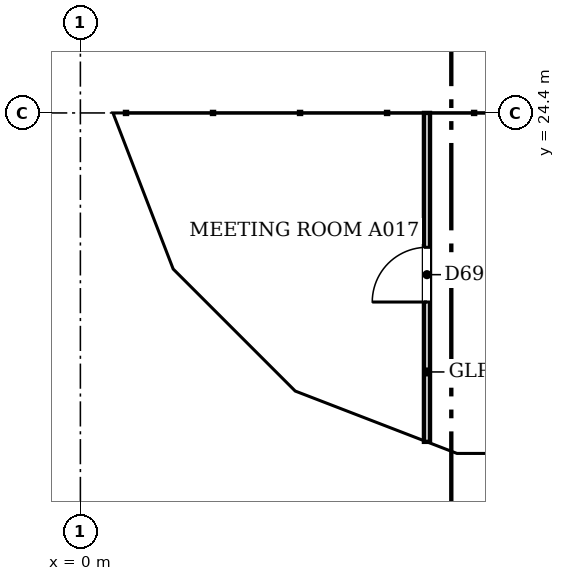
"""IFC4 building model, lengths in metres.
Left out: names, types, materials, properties, quantities, classifications, styles, units other than length and angle.
Written with IfcOpenShell. Run it as: python <this file> out.ifc"""

import sys

from ifc_helpers import new_model, si_unit, direction, frame, frame_2d, origin, place, context, subcontext, project, spatial, polyline, rectangle, outline, extrude, faceted_brep, source, transform, mapped, element, fill, save


model = new_model("IFC4")
c1 = context("Model", 3, precision=1e-05, world=origin(), true_north=direction((0.0, 1.0)))
c2 = subcontext(c1, "Body", "Model", "MODEL_VIEW")
j1 = project(units=[si_unit("LENGTHUNIT", "METRE"), si_unit("PLANEANGLEUNIT", "RADIAN")], contexts=[c1])
p1 = place(None, origin())
s1 = spatial("IfcSite", under=j1, at=p1, CompositionType="ELEMENT")
p2 = place(p1, origin())
s2 = spatial("IfcBuilding", under=s1, at=p2, CompositionType="ELEMENT")
p3 = place(p2, frame((0.0, 0.0, 146.8)))
s3 = spatial("IfcBuildingStorey", under=s2, at=p3, CompositionType="ELEMENT", Elevation=146.8)
m1 = source(origin(), c2, "Body", "Brep", [
    faceted_brep([(3.003, -0.25, 0.0), (3.05, -0.25, 0.06), (3.05, -0.25, 7.54), (3.003, -0.25, 7.6), (0.0, -0.25, 3.8), (0.0, 0.25, 3.8), (2.957, 0.25, 7.541), (2.957, 0.25, 0.059), (3.003, 0.0, 0.0), (3.003, 0.0, 7.6)], [[[0, 1, 2, 3, 4]], [[5, 6, 7]], [[1, 0, 8]], [[9, 3, 2]], [[6, 5, 4, 3, 9]], [[5, 7, 8, 0, 4]], [[1, 8, 7, 6, 9, 2]]]),
])
p4 = place(p3, frame((0.25, 27.45, -3.8), z_axis=(0.0, 0.0, 1.0), x_axis=(0.0, -1.0, 0.0)))
e1 = element("IfcWall", 1, at=p4, inside=s3, PredefinedType="SOLIDWALL", context=c2, shape_type="MappedRepresentation", body=[
    mapped(m1, transform((0.0, 0.0, 0.0), scale=1.0)),
])
m2 = source(origin(), c2, "Body", "SweptSolid", [
    extrude(outline(polyline([(2.803, 6.944), (0.319, 3.8), (2.803, 0.656), (2.803, 6.944)])), frame((0.0, 0.26, 0.0), z_axis=(0.0, -1.0, 0.0), x_axis=(1.0, 0.0, 0.0)), (0.0, 0.0, 1.0), 0.52),
])
p5 = place(p4, origin())
e2 = element("IfcOpeningElement", 2, at=p5, cuts=e1, PredefinedType="OPENING", context=c2, shape_type="MappedRepresentation", body=[
    mapped(m2, transform((0.0, 0.0, 0.0), scale=1.0)),
])
m3 = source(origin(), c2, "Body", "Brep", [
    faceted_brep([(0.047, -0.25, 0.0), (2.997, -0.25, 3.8), (0.047, -0.25, 7.6), (0.0, -0.25, 7.541), (0.0, -0.25, 0.059), (0.093, 0.25, 7.54), (2.944, 0.25, 3.868), (2.944, 0.25, 3.732), (0.093, 0.25, 0.06), (2.997, 0.0, 3.8), (0.047, 0.0, 0.0), (0.047, 0.0, 7.6)], [[[0, 1, 2, 3, 4]], [[5, 6, 7, 8]], [[8, 7, 9, 1, 0, 10]], [[6, 5, 11, 2, 1, 9]], [[3, 2, 11]], [[10, 0, 4]], [[8, 10, 4, 3, 11, 5]], [[9, 7, 6]]]),
])
p6 = place(p3, frame((0.233, 24.49, -3.8), z_axis=(0.0, 0.0, 1.0), x_axis=(0.359901446078, -0.932990326376, 0.0)))
e3 = element("IfcWall", 3, at=p6, inside=s3, PredefinedType="SOLIDWALL", context=c2, shape_type="MappedRepresentation", body=[
    mapped(m3, transform((0.0, 0.0, 0.0), scale=1.0)),
])
m4 = source(origin(), c2, "Body", "SweptSolid", [
    extrude(outline(polyline([(0.247, 0.665), (2.681, 3.8), (0.247, 6.935), (0.247, 0.665)])), frame((0.0, 0.26, 0.0), z_axis=(0.0, -1.0, 0.0), x_axis=(1.0, 0.0, 0.0)), (0.0, 0.0, 1.0), 0.52),
])
p7 = place(p6, origin())
e4 = element("IfcOpeningElement", 4, at=p7, cuts=e3, PredefinedType="OPENING", context=c2, shape_type="MappedRepresentation", body=[
    mapped(m4, transform((0.0, 0.0, 0.0), scale=1.0)),
])
m5 = source(origin(), c2, "Body", "Brep", [
    faceted_brep([(2.944, -0.25, 0.0), (2.997, -0.25, 0.068), (2.997, -0.25, 7.532), (2.944, -0.25, 7.6), (0.0, -0.25, 3.8), (0.053, 0.25, 3.868), (2.891, 0.25, 7.532), (2.891, 0.25, 0.068), (0.053, 0.25, 3.732), (2.944, 0.0, 0.0), (2.944, 0.0, 7.6), (0.0, 0.0, 3.8)], [[[0, 1, 2, 3, 4]], [[5, 6, 7, 8]], [[1, 0, 9]], [[10, 3, 2]], [[6, 5, 11, 4, 3, 10]], [[8, 7, 9, 0, 4, 11]], [[8, 11, 5]], [[1, 9, 7, 6, 10, 2]]]),
])
p8 = place(p3, frame((1.312, 21.694, -3.8), z_axis=(0.0, 0.0, 1.0), x_axis=(0.707066050402, -0.707147509625, 0.0)))
e5 = element("IfcWall", 5, at=p8, inside=s3, PredefinedType="SOLIDWALL", context=c2, shape_type="MappedRepresentation", body=[
    mapped(m5, transform((0.0, 0.0, 0.0), scale=1.0)),
])
m6 = source(origin(), c2, "Body", "SweptSolid", [
    extrude(outline(polyline([(2.744, 6.934), (0.316, 3.8), (2.744, 0.666), (2.744, 6.934)])), frame((0.0, 0.26, 0.0), z_axis=(0.0, -1.0, 0.0), x_axis=(1.0, 0.0, 0.0)), (0.0, 0.0, 1.0), 0.52),
])
p9 = place(p8, origin())
e6 = element("IfcOpeningElement", 6, at=p9, cuts=e5, PredefinedType="OPENING", context=c2, shape_type="MappedRepresentation", body=[
    mapped(m6, transform((0.0, 0.0, 0.0), scale=1.0)),
])
m7 = source(origin(), c2, "Body", "Brep", [
    faceted_brep([(0.053, -0.25, 0.0), (3.003, -0.25, 3.8), (0.053, -0.25, 7.6), (0.0, -0.25, 7.532), (0.0, -0.25, 0.068), (0.106, 0.25, 7.532), (2.957, 0.25, 3.86), (2.957, 0.25, 3.74), (0.106, 0.25, 0.068), (3.003, 0.0, 3.8), (0.053, 0.0, 0.0), (0.053, 0.0, 7.6)], [[[0, 1, 2, 3, 4]], [[5, 6, 7, 8]], [[8, 7, 9, 1, 0, 10]], [[6, 5, 11, 2, 1, 9]], [[3, 2, 11]], [[10, 0, 4]], [[8, 10, 4, 3, 11, 5]], [[9, 7, 6]]]),
])
p10 = place(p3, frame((3.344, 19.631, -3.8), z_axis=(0.0, 0.0, 1.0), x_axis=(0.933007896601, -0.359855894603, 0.0)))
e7 = element("IfcWall", 7, at=p10, inside=s3, PredefinedType="SOLIDWALL", context=c2, shape_type="MappedRepresentation", body=[
    mapped(m7, transform((0.0, 0.0, 0.0), scale=1.0)),
])
m8 = source(origin(), c2, "Body", "SweptSolid", [
    extrude(outline(polyline([(0.253, 0.665), (2.687, 3.8), (0.253, 6.935), (0.253, 0.665)])), frame((0.0, 0.26, 0.0), z_axis=(0.0, -1.0, 0.0), x_axis=(1.0, 0.0, 0.0)), (0.0, 0.0, 1.0), 0.52),
])
p11 = place(p10, origin())
e8 = element("IfcOpeningElement", 8, at=p11, cuts=e7, PredefinedType="OPENING", context=c2, shape_type="MappedRepresentation", body=[
    mapped(m8, transform((0.0, 0.0, 0.0), scale=1.0)),
])
m9 = source(origin(), c2, "Body", "Brep", [
    faceted_brep([(3.003, -0.25, 0.0), (6.053, -0.25, 3.8), (3.003, -0.25, 7.6), (0.0, -0.25, 3.8), (0.047, 0.25, 3.859), (3.003, 0.25, 7.6), (6.053, 0.25, 3.8), (3.003, 0.25, 0.0), (0.047, 0.25, 3.741), (0.0, 0.0, 3.8)], [[[0, 1, 2, 3]], [[4, 5, 6, 7, 8]], [[7, 6, 1, 0]], [[6, 5, 2, 1]], [[5, 4, 9, 3, 2]], [[8, 7, 0, 3, 9]], [[8, 9, 4]]]),
])
p12 = place(p3, frame((6.146, 18.55, -3.8), z_axis=(0.0, 0.0, 1.0), x_axis=(1.0, 0.0, 0.0)))
e9 = element("IfcWall", 9, at=p12, inside=s3, PredefinedType="SOLIDWALL", context=c2, shape_type="MappedRepresentation", body=[
    mapped(m9, transform((0.0, 0.0, 0.0), scale=1.0)),
])
m10 = source(origin(), c2, "Body", "SweptSolid", [
    extrude(outline(polyline([(3.005, 0.401), (5.733, 3.8), (3.005, 7.199), (0.319, 3.8), (3.005, 0.401)])), frame((0.0, 0.26, 0.0), z_axis=(0.0, -1.0, 0.0), x_axis=(1.0, 0.0, 0.0)), (0.0, 0.0, 1.0), 0.52),
])
p13 = place(p12, origin())
e10 = element("IfcOpeningElement", 10, at=p13, cuts=e9, PredefinedType="OPENING", context=c2, shape_type="MappedRepresentation", body=[
    mapped(m10, transform((0.0, 0.0, 0.0), scale=1.0)),
])
m11 = source(origin(), c2, "Body", "Brep", [
    faceted_brep([(3.05, -0.25, 0.0), (6.053, -0.25, 3.8), (0.0, -0.25, 3.8), (0.0, 0.25, 3.8), (6.007, 0.25, 3.8), (6.007, 0.25, 3.741), (3.05, 0.25, 0.0), (6.053, 0.0, 3.8)], [[[0, 1, 2]], [[3, 4, 5, 6]], [[6, 5, 7, 1, 0]], [[4, 3, 2, 1, 7]], [[3, 6, 0, 2]], [[5, 4, 7]]]),
])
p14 = place(p3, frame((0.25, 30.5, 0.0), z_axis=(0.0, 0.0, 1.0), x_axis=(0.0, -1.0, 0.0)))
e11 = element("IfcWall", 11, at=p14, inside=s3, PredefinedType="SOLIDWALL", context=c2, shape_type="MappedRepresentation", body=[
    mapped(m11, transform((0.0, 0.0, 0.0), scale=1.0)),
])
m12 = source(origin(), c2, "Body", "SweptSolid", [
    extrude(outline(polyline([(3.049, 0.401), (5.537, 3.55), (0.521, 3.55), (3.049, 0.401)])), frame((0.0, 0.26, 0.0), z_axis=(0.0, -1.0, 0.0), x_axis=(1.0, 0.0, 0.0)), (0.0, 0.0, 1.0), 0.52),
])
p15 = place(p14, origin())
e12 = element("IfcOpeningElement", 12, at=p15, cuts=e11, PredefinedType="OPENING", context=c2, shape_type="MappedRepresentation", body=[
    mapped(m12, transform((0.0, 0.0, 0.0), scale=1.0)),
])
m13 = source(origin(), c2, "Body", "Brep", [
    faceted_brep([(2.95, -0.25, 0.0), (3.003, -0.25, 0.068), (3.003, -0.25, 3.8), (0.0, -0.25, 3.8), (0.047, 0.25, 3.8), (2.898, 0.25, 3.8), (2.898, 0.25, 0.068), (0.047, 0.25, 3.74), (2.95, 0.0, 0.0), (0.0, 0.0, 3.8)], [[[0, 1, 2, 3]], [[4, 5, 6, 7]], [[1, 0, 8]], [[5, 4, 9, 3, 2]], [[7, 6, 8, 0, 3, 9]], [[7, 9, 4]], [[1, 8, 6, 5, 2]]]),
])
p16 = place(p3, frame((0.25, 24.447, 0.0), z_axis=(0.0, 0.0, 1.0), x_axis=(0.35992665181, -0.932980602862, 0.0)))
e13 = element("IfcWall", 13, at=p16, inside=s3, PredefinedType="SOLIDWALL", context=c2, shape_type="MappedRepresentation", body=[
    mapped(m13, transform((0.0, 0.0, 0.0), scale=1.0)),
])
m14 = source(origin(), c2, "Body", "SweptSolid", [
    extrude(outline(polyline([(2.75, 3.55), (0.511, 3.55), (2.75, 0.665), (2.75, 3.55)])), frame((0.0, 0.26, 0.0), z_axis=(0.0, -1.0, 0.0), x_axis=(1.0, 0.0, 0.0)), (0.0, 0.0, 1.0), 0.52),
])
p17 = place(p16, origin())
e14 = element("IfcOpeningElement", 14, at=p17, cuts=e13, PredefinedType="OPENING", context=c2, shape_type="MappedRepresentation", body=[
    mapped(m14, transform((0.0, 0.0, 0.0), scale=1.0)),
])
m15 = source(origin(), c2, "Body", "Brep", [
    faceted_brep([(0.053, -0.25, 0.0), (2.997, -0.25, 3.8), (0.0, -0.25, 3.8), (0.0, -0.25, 0.068), (0.106, 0.25, 3.8), (2.944, 0.25, 3.8), (2.944, 0.25, 3.732), (0.106, 0.25, 0.068), (2.997, 0.0, 3.8), (0.053, 0.0, 0.0)], [[[0, 1, 2, 3]], [[4, 5, 6, 7]], [[7, 6, 8, 1, 0, 9]], [[5, 4, 2, 1, 8]], [[9, 0, 3]], [[7, 9, 3, 2, 4]], [[6, 5, 8]]]),
])
p18 = place(p3, frame((1.274, 21.731, 0.0), z_axis=(0.0, 0.0, 1.0), x_axis=(0.707147509625, -0.707066050402, 0.0)))
e15 = element("IfcWall", 15, at=p18, inside=s3, PredefinedType="SOLIDWALL", context=c2, shape_type="MappedRepresentation", body=[
    mapped(m15, transform((0.0, 0.0, 0.0), scale=1.0)),
])
m16 = source(origin(), c2, "Body", "SweptSolid", [
    extrude(outline(polyline([(0.253, 0.666), (2.487, 3.55), (0.253, 3.55), (0.253, 0.666)])), frame((0.0, 0.26, 0.0), z_axis=(0.0, -1.0, 0.0), x_axis=(1.0, 0.0, 0.0)), (0.0, 0.0, 1.0), 0.52),
])
p19 = place(p18, origin())
e16 = element("IfcOpeningElement", 16, at=p19, cuts=e15, PredefinedType="OPENING", context=c2, shape_type="MappedRepresentation", body=[
    mapped(m16, transform((0.0, 0.0, 0.0), scale=1.0)),
])
m17 = source(origin(), c2, "Body", "Brep", [
    faceted_brep([(2.95, -0.25, 0.0), (2.997, -0.25, 0.059), (2.997, -0.25, 3.8), (0.0, -0.25, 3.8), (0.053, 0.25, 3.8), (2.904, 0.25, 3.8), (2.904, 0.25, 0.06), (0.053, 0.25, 3.732), (2.95, 0.0, 0.0), (0.0, 0.0, 3.8)], [[[0, 1, 2, 3]], [[4, 5, 6, 7]], [[1, 0, 8]], [[5, 4, 9, 3, 2]], [[7, 6, 8, 0, 3, 9]], [[7, 9, 4]], [[1, 8, 6, 5, 2]]]),
])
p20 = place(p3, frame((3.394, 19.612, 0.0), z_axis=(0.0, 0.0, 1.0), x_axis=(0.932990326376, -0.359901446078, 0.0)))
e17 = element("IfcWall", 17, at=p20, inside=s3, PredefinedType="SOLIDWALL", context=c2, shape_type="MappedRepresentation", body=[
    mapped(m17, transform((0.0, 0.0, 0.0), scale=1.0)),
])
p21 = place(p20, origin())
e18 = element("IfcOpeningElement", 18, at=p21, cuts=e17, PredefinedType="OPENING", context=c2, shape_type="MappedRepresentation", body=[
    mapped(m14, transform((0.0, 0.0, 0.0), scale=1.0)),
])
m18 = source(origin(), c2, "Body", "Brep", [
    faceted_brep([(0.047, -0.25, 0.0), (3.05, -0.25, 3.8), (0.0, -0.25, 3.8), (0.0, -0.25, 0.06), (0.093, 0.25, 3.8), (3.05, 0.25, 3.8), (0.093, 0.25, 0.059), (0.047, 0.0, 0.0)], [[[0, 1, 2, 3]], [[4, 5, 6]], [[6, 5, 1, 0, 7]], [[5, 4, 2, 1]], [[7, 0, 3]], [[6, 7, 3, 2, 4]]]),
])
p22 = place(p3, frame((6.1, 18.55, 0.0), z_axis=(0.0, 0.0, 1.0), x_axis=(1.0, 0.0, 0.0)))
e19 = element("IfcWall", 19, at=p22, inside=s3, PredefinedType="SOLIDWALL", context=c2, shape_type="MappedRepresentation", body=[
    mapped(m18, transform((0.0, 0.0, 0.0), scale=1.0)),
])
m19 = source(origin(), c2, "Body", "SweptSolid", [
    extrude(outline(polyline([(0.247, 0.656), (2.534, 3.55), (0.247, 3.55), (0.247, 0.656)])), frame((0.0, 0.26, 0.0), z_axis=(0.0, -1.0, 0.0), x_axis=(1.0, 0.0, 0.0)), (0.0, 0.0, 1.0), 0.52),
])
p23 = place(p22, origin())
e20 = element("IfcOpeningElement", 20, at=p23, cuts=e19, PredefinedType="OPENING", context=c2, shape_type="MappedRepresentation", body=[
    mapped(m19, transform((0.0, 0.0, 0.0), scale=1.0)),
])
p24 = place(p3, frame((5.7, 18.99, 0.0), z_axis=(0.0, 0.0, 1.0), x_axis=(0.0, 1.0, 0.0)))
e21 = element("IfcWall", 21, at=p24, inside=s3, PredefinedType="PARTITIONING", context=c2, shape_type="SweptSolid", body=[
    extrude(rectangle(XDim=5.41, YDim=0.1, at=frame_2d((2.705, 0.0))), origin(), (0.0, 0.0, 1.0), 2.888),
])
m20 = source(origin(), c2, "Body", "SweptSolid", [
    extrude(rectangle(XDim=0.9, YDim=2.1, at=frame_2d((0.45, 1.05))), frame((0.0, 0.06, 0.0), z_axis=(0.0, -1.0, 0.0), x_axis=(1.0, 0.0, 0.0)), (0.0, 0.0, 1.0), 0.12),
])
p25 = place(p24, frame((2.3, 0.0, 0.0)))
e22 = element("IfcOpeningElement", 22, at=p25, cuts=e21, PredefinedType="OPENING", context=c2, shape_type="MappedRepresentation", body=[
    mapped(m20, transform((0.0, 0.0, 0.0), scale=1.0)),
])
m21 = source(origin(), c2, "Body", "SweptSolid", [
    extrude(rectangle(XDim=0.9, YDim=2.1, at=frame_2d((0.45, 1.05))), frame((0.0, 0.025, 0.0), z_axis=(0.0, -1.0, 0.0), x_axis=(1.0, 0.0, 0.0)), (0.0, 0.0, 1.0), 0.05),
])
p26 = place(p25, origin())
e23 = element("IfcDoor", 23, at=p26, inside=s3, OperationType="SINGLE_SWING_LEFT", PredefinedType="DOOR", context=c2, shape_type="MappedRepresentation", body=[
    mapped(m21, transform((0.0, 0.0, 0.0), scale=1.0)),
])
fill(e22, e23)
save(model, sys.argv[1])
